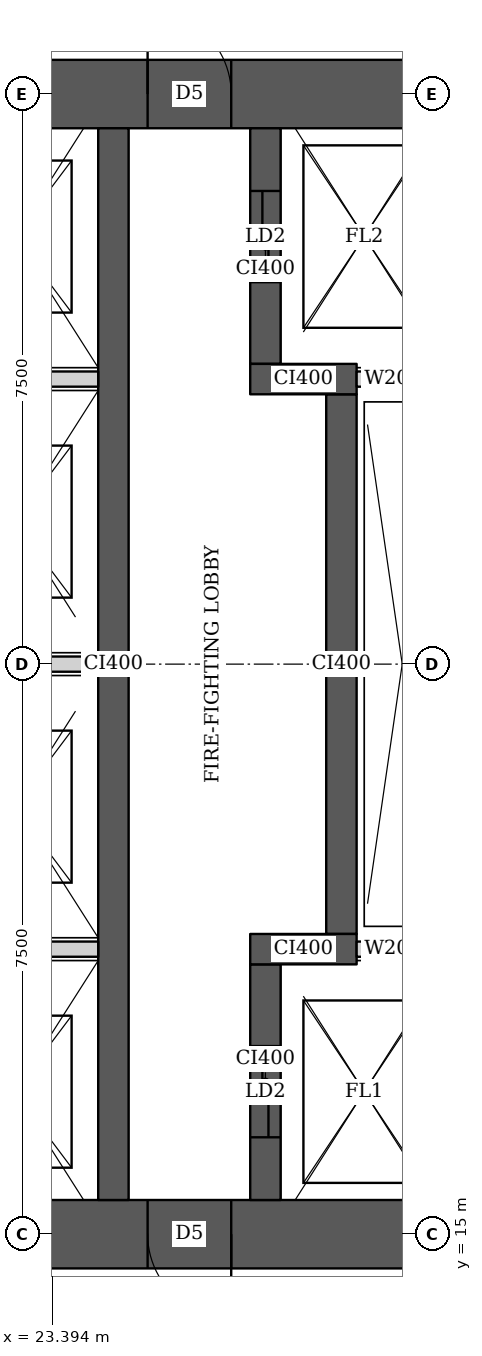
"""IFC4 building model, lengths in metres.
Left out: names, types, materials, properties, quantities, classifications, styles, units other than length and angle.
Written with IfcOpenShell. Run it as: python <this file> out.ifc"""

import sys

from ifc_helpers import new_model, si_unit, direction, frame, frame_2d, origin, place, context, subcontext, project, spatial, rectangle, extrude, element, fill, save


model = new_model("IFC4")
c1 = context("Model", 3, precision=1e-05, world=origin(), true_north=direction((0.0, 1.0)))
c2 = subcontext(c1, "Body", "Model", "MODEL_VIEW")
j1 = project(units=[si_unit("LENGTHUNIT", "METRE"), si_unit("PLANEANGLEUNIT", "RADIAN")], contexts=[c1])
p1 = place(None, origin())
s1 = spatial("IfcSite", under=j1, at=p1, CompositionType="ELEMENT")
p2 = place(p1, origin())
s2 = spatial("IfcBuilding", under=s1, at=p2, CompositionType="ELEMENT")
p3 = place(p2, frame((0.0, 0.0, 255.35)))
s3 = spatial("IfcBuildingStorey", under=s2, at=p3, CompositionType="ELEMENT", Elevation=255.35)
p4 = place(p3, frame((13.95, 15.0, 0.0), z_axis=(0.0, 0.0, 1.0), x_axis=(1.0, 0.0, 0.0)))
e1 = element("IfcWall", 1, at=p4, inside=s3, PredefinedType="SHEAR", context=c2, shape_type="SweptSolid", body=[
    extrude(rectangle(XDim=15.3, YDim=0.9, at=frame_2d((7.65, 0.0))), origin(), (0.0, 0.0, 1.0), 3.75),
])
p5 = place(p4, frame((4.45, 0.0, 0.0)))
e2 = element("IfcOpeningElement", 2, at=p5, cuts=e1, PredefinedType="OPENING", context=c2, shape_type="SweptSolid", body=[
    extrude(rectangle(XDim=1.8, YDim=2.1, at=frame_2d((0.9, 1.05))), frame((0.0, 0.46, 0.0), z_axis=(0.0, -1.0, 0.0), x_axis=(1.0, 0.0, 0.0)), (0.0, 0.0, 1.0), 0.92),
])
p6 = place(p4, frame((10.7, 0.0, 0.0)))
e3 = element("IfcOpeningElement", 3, at=p6, cuts=e1, PredefinedType="OPENING", context=c2, shape_type="SweptSolid", body=[
    extrude(rectangle(XDim=1.1, YDim=2.1, at=frame_2d((0.55, 1.05))), frame((0.0, 0.46, 0.0), z_axis=(0.0, -1.0, 0.0), x_axis=(1.0, 0.0, 0.0)), (0.0, 0.0, 1.0), 0.92),
])
p7 = place(p3, frame((13.95, 30.0, 0.0), z_axis=(0.0, 0.0, 1.0), x_axis=(1.0, 0.0, 0.0)))
e4 = element("IfcWall", 4, at=p7, inside=s3, PredefinedType="SHEAR", context=c2, shape_type="SweptSolid", body=[
    extrude(rectangle(XDim=15.3, YDim=0.9, at=frame_2d((7.65, 0.0))), origin(), (0.0, 0.0, 1.0), 3.75),
])
p8 = place(p7, frame((4.45, 0.0, 0.0)))
e5 = element("IfcOpeningElement", 5, at=p8, cuts=e4, PredefinedType="OPENING", context=c2, shape_type="SweptSolid", body=[
    extrude(rectangle(XDim=1.8, YDim=2.1, at=frame_2d((0.9, 1.05))), frame((0.0, 0.46, 0.0), z_axis=(0.0, -1.0, 0.0), x_axis=(1.0, 0.0, 0.0)), (0.0, 0.0, 1.0), 0.92),
])
p9 = place(p7, frame((10.7, 0.0, 0.0)))
e6 = element("IfcOpeningElement", 6, at=p9, cuts=e4, PredefinedType="OPENING", context=c2, shape_type="SweptSolid", body=[
    extrude(rectangle(XDim=1.1, YDim=2.1, at=frame_2d((0.55, 1.05))), frame((0.0, 0.46, 0.0), z_axis=(0.0, -1.0, 0.0), x_axis=(1.0, 0.0, 0.0)), (0.0, 0.0, 1.0), 0.92),
])
p10 = place(p3, frame((24.2, 15.45, 0.0), z_axis=(0.0, 0.0, 1.0), x_axis=(0.0, 1.0, 0.0)))
e7 = element("IfcWall", 7, at=p10, inside=s3, PredefinedType="SHEAR", context=c2, shape_type="SweptSolid", body=[
    extrude(rectangle(XDim=14.1, YDim=0.4, at=frame_2d((7.05, 0.0))), origin(), (0.0, 0.0, 1.0), 3.75),
])
p11 = place(p3, frame((26.2, 15.45, 0.0), z_axis=(0.0, 0.0, 1.0), x_axis=(0.0, 1.0, 0.0)))
e8 = element("IfcWall", 8, at=p11, inside=s3, PredefinedType="SHEAR", context=c2, shape_type="SweptSolid", body=[
    extrude(rectangle(XDim=3.1, YDim=0.4, at=frame_2d((1.55, 0.0))), origin(), (0.0, 0.0, 1.0), 3.75),
])
p12 = place(p11, frame((0.825, 0.0, 0.0)))
e9 = element("IfcOpeningElement", 9, at=p12, cuts=e8, PredefinedType="OPENING", context=c2, shape_type="SweptSolid", body=[
    extrude(rectangle(XDim=1.2, YDim=2.1, at=frame_2d((0.6, 1.05))), frame((0.0, 0.21, 0.0), z_axis=(0.0, -1.0, 0.0), x_axis=(1.0, 0.0, 0.0)), (0.0, 0.0, 1.0), 0.42),
])
p13 = place(p3, frame((26.0, 18.75, 0.0), z_axis=(0.0, 0.0, 1.0), x_axis=(1.0, 0.0, 0.0)))
e10 = element("IfcWall", 10, at=p13, inside=s3, PredefinedType="SHEAR", context=c2, shape_type="SweptSolid", body=[
    extrude(rectangle(XDim=1.4, YDim=0.4, at=frame_2d((0.7, 0.0))), origin(), (0.0, 0.0, 1.0), 3.75),
])
p14 = place(p3, frame((27.2, 18.95, 0.0), z_axis=(0.0, 0.0, 1.0), x_axis=(0.0, 1.0, 0.0)))
e11 = element("IfcWall", 11, at=p14, inside=s3, PredefinedType="SHEAR", context=c2, shape_type="SweptSolid", body=[
    extrude(rectangle(XDim=7.1, YDim=0.4, at=frame_2d((3.55, 0.0))), origin(), (0.0, 0.0, 1.0), 3.75),
])
p15 = place(p3, frame((26.0, 26.25, 0.0), z_axis=(0.0, 0.0, 1.0), x_axis=(1.0, 0.0, 0.0)))
e12 = element("IfcWall", 12, at=p15, inside=s3, PredefinedType="SHEAR", context=c2, shape_type="SweptSolid", body=[
    extrude(rectangle(XDim=1.4, YDim=0.4, at=frame_2d((0.7, 0.0))), origin(), (0.0, 0.0, 1.0), 3.75),
])
p16 = place(p3, frame((26.2, 26.45, 0.0), z_axis=(0.0, 0.0, 1.0), x_axis=(0.0, 1.0, 0.0)))
e13 = element("IfcWall", 13, at=p16, inside=s3, PredefinedType="SHEAR", context=c2, shape_type="SweptSolid", body=[
    extrude(rectangle(XDim=3.1, YDim=0.4, at=frame_2d((1.55, 0.0))), origin(), (0.0, 0.0, 1.0), 3.75),
])
p17 = place(p16, frame((1.075, 0.0, 0.0)))
e14 = element("IfcOpeningElement", 14, at=p17, cuts=e13, PredefinedType="OPENING", context=c2, shape_type="SweptSolid", body=[
    extrude(rectangle(XDim=1.2, YDim=2.1, at=frame_2d((0.6, 1.05))), frame((0.0, 0.21, 0.0), z_axis=(0.0, -1.0, 0.0), x_axis=(1.0, 0.0, 0.0)), (0.0, 0.0, 1.0), 0.42),
])
for number, where, z_axis, x_axis in (
    (15, (21.8, 18.75, 0.0), (0.0, 0.0, 1.0), (1.0, 0.0, 0.0)),
    (16, (21.8, 22.5, 0.0), (0.0, 0.0, 1.0), (1.0, 0.0, 0.0)),
    (17, (21.8, 26.25, 0.0), (0.0, 0.0, 1.0), (1.0, 0.0, 0.0)),
):
    element("IfcWall", number, at=place(p3, frame(where, z_axis=z_axis, x_axis=x_axis)), inside=s3, PredefinedType="SOLIDWALL", context=c2, shape_type="SweptSolid", body=[
        extrude(rectangle(XDim=2.2, YDim=0.2, at=frame_2d((1.1, 0.0))), origin(), (0.0, 0.0, 1.0), 3.5),
    ])
for number, where, z_axis, x_axis in (
    (18, (27.4, 18.75, 0.0), (0.0, 0.0, 1.0), (1.0, 0.0, 0.0)),
    (19, (27.4, 26.25, 0.0), (0.0, 0.0, 1.0), (1.0, 0.0, 0.0)),
):
    element("IfcWall", number, at=place(p3, frame(where, z_axis=z_axis, x_axis=x_axis)), inside=s3, PredefinedType="SOLIDWALL", context=c2, shape_type="SweptSolid", body=[
        extrude(rectangle(XDim=0.95, YDim=0.2, at=frame_2d((0.475, 0.0))), origin(), (0.0, 0.0, 1.0), 3.5),
    ])
p18 = place(p6, origin())
e20 = element("IfcDoor", 20, at=p18, inside=s3, OperationType="SINGLE_SWING_LEFT", PredefinedType="DOOR", context=c2, shape_type="SweptSolid", body=[
    extrude(rectangle(XDim=1.1, YDim=2.1, at=frame_2d((0.55, 1.05))), frame((0.0, 0.025, 0.0), z_axis=(0.0, -1.0, 0.0), x_axis=(1.0, 0.0, 0.0)), (0.0, 0.0, 1.0), 0.05),
])
fill(e3, e20)
p19 = place(p9, origin())
e21 = element("IfcDoor", 21, at=p19, inside=s3, OperationType="SINGLE_SWING_LEFT", PredefinedType="DOOR", context=c2, shape_type="SweptSolid", body=[
    extrude(rectangle(XDim=1.1, YDim=2.1, at=frame_2d((0.55, 1.05))), frame((0.0, 0.025, 0.0), z_axis=(0.0, -1.0, 0.0), x_axis=(1.0, 0.0, 0.0)), (0.0, 0.0, 1.0), 0.05),
])
fill(e6, e21)
p20 = place(p12, origin())
e22 = element("IfcDoor", 22, at=p20, inside=s3, OperationType="DOUBLE_DOOR_SLIDING", PredefinedType="DOOR", context=c2, shape_type="SweptSolid", body=[
    extrude(rectangle(XDim=1.2, YDim=2.1, at=frame_2d((0.6, 1.05))), frame((0.0, 0.025, 0.0), z_axis=(0.0, -1.0, 0.0), x_axis=(1.0, 0.0, 0.0)), (0.0, 0.0, 1.0), 0.05),
])
fill(e9, e22)
p21 = place(p17, origin())
e23 = element("IfcDoor", 23, at=p21, inside=s3, OperationType="DOUBLE_DOOR_SLIDING", PredefinedType="DOOR", context=c2, shape_type="SweptSolid", body=[
    extrude(rectangle(XDim=1.2, YDim=2.1, at=frame_2d((0.6, 1.05))), frame((0.0, 0.025, 0.0), z_axis=(0.0, -1.0, 0.0), x_axis=(1.0, 0.0, 0.0)), (0.0, 0.0, 1.0), 0.05),
])
fill(e14, e23)
save(model, sys.argv[1])
